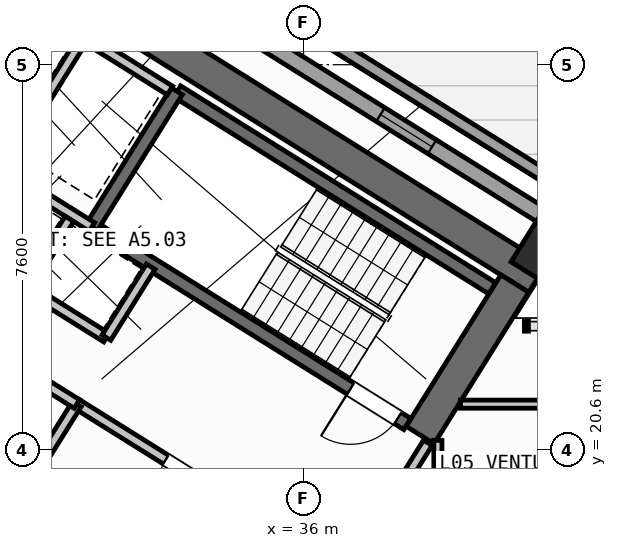
"""IFC4 building model, lengths in metres.
Left out: names, types, materials, properties, quantities, classifications, styles, units other than length and angle.
Written with IfcOpenShell. Run it as: python <this file> out.ifc"""

import sys

from ifc_helpers import new_model, si_unit, direction, frame, frame_2d, origin, origin_2d, place, context, subcontext, project, spatial, rectangle, hollow_rectangle, extrude, source, transform, mapped, element, fill, save


model = new_model("IFC4")
c1 = context("Model", 3, precision=1e-05, world=origin(), true_north=direction((0.0, 1.0)))
c2 = subcontext(c1, "Body", "Model", "MODEL_VIEW")
j1 = project(units=[si_unit("LENGTHUNIT", "METRE"), si_unit("PLANEANGLEUNIT", "RADIAN")], contexts=[c1])
p1 = place(None, origin())
s1 = spatial("IfcSite", under=j1, at=p1, CompositionType="ELEMENT")
p2 = place(p1, origin())
s2 = spatial("IfcBuilding", under=s1, at=p2, CompositionType="ELEMENT")
p3 = place(p2, frame((0.0, 0.0, 24.0)))
s3 = spatial("IfcBuildingStorey", under=s2, at=p3, CompositionType="ELEMENT", Elevation=24.0)
p4 = place(p3, frame((40.615, 23.983, 0.0), z_axis=(0.0, 0.0, 1.0), x_axis=(-0.848045953968, 0.529922692436, 0.0)))
e1 = element("IfcWall", 1, at=p4, inside=s3, PredefinedType="SHEAR", context=c2, shape_type="SweptSolid", body=[
    extrude(rectangle(XDim=13.24, YDim=0.65, at=frame_2d((6.62, 0.0))), origin(), (0.0, 0.0, 1.0), 3.35),
])
p5 = place(p3, frame((40.168, 23.88, 0.0), z_axis=(0.0, 0.0, 1.0), x_axis=(-0.529893103397, -0.8480644427, 0.0)))
e2 = element("IfcWall", 2, at=p5, inside=s3, PredefinedType="SHEAR", context=c2, shape_type="SweptSolid", body=[
    extrude(rectangle(XDim=3.525, YDim=0.65, at=frame_2d((1.763, 0.0))), origin(), (0.0, 0.0, 1.0), 3.35),
])
m1 = source(origin(), c2, "Body", "SweptSolid", [
    extrude(hollow_rectangle(XDim=1.0, YDim=1.0, WallThickness=0.04, at=origin_2d()), origin(), (0.0, 0.0, 1.0), 3.6),
])
p6 = place(p3, frame((40.783, 24.469, 0.0), z_axis=(0.0, 0.0, 1.0), x_axis=(-0.848048096156, 0.529919264233, 0.0)))
e3 = element("IfcColumn", 3, at=p6, inside=s3, PredefinedType="COLUMN", context=c2, shape_type="MappedRepresentation", body=[
    mapped(m1, transform((0.0, 0.0, 0.0), scale=1.0)),
])
p7 = place(p3, frame((40.961, 25.878, 0.0), z_axis=(0.0, 0.0, 1.0), x_axis=(-0.848053997745, 0.5299098196, 0.0)))
e4 = element("IfcWall", 4, at=p7, inside=s3, PredefinedType="PARAPET", context=c2, shape_type="SweptSolid", body=[
    extrude(rectangle(XDim=11.574, YDim=0.24, at=frame_2d((5.787, 0.0))), origin(), (0.0, 0.0, 1.0), 1.15),
])
p8 = place(p3, frame((14.138, 41.825, 0.0), z_axis=(0.0, 0.0, 1.0), x_axis=(0.848046498049, -0.529921821731, 0.0)))
e5 = element("IfcWall", 5, at=p8, inside=s3, PredefinedType="STANDARD", context=c2, shape_type="SweptSolid", body=[
    extrude(rectangle(XDim=31.588, YDim=0.32, at=frame_2d((15.794, 0.0))), origin(), (0.0, 0.0, 1.0), 3.35),
])
p9 = place(p8, frame((3.369, 0.0, 0.0)))
e6 = element("IfcOpeningElement", 6, at=p9, cuts=e5, PredefinedType="OPENING", context=c2, shape_type="SweptSolid", body=[
    extrude(rectangle(XDim=1.05, YDim=2.15, at=frame_2d((0.525, 1.075))), frame((0.0, 0.17, 0.0), z_axis=(0.0, -1.0, 0.0), x_axis=(1.0, 0.0, 0.0)), (0.0, 0.0, 1.0), 0.34),
])
p10 = place(p8, frame((0.946, 0.0, 0.85)))
e7 = element("IfcOpeningElement", 7, at=p10, cuts=e5, PredefinedType="OPENING", context=c2, shape_type="SweptSolid", body=[
    extrude(rectangle(XDim=1.8, YDim=1.5, at=frame_2d((0.9, 0.75))), frame((0.0, 0.17, 0.0), z_axis=(0.0, -1.0, 0.0), x_axis=(1.0, 0.0, 0.0)), (0.0, 0.0, 1.0), 0.34),
])
p11 = place(p8, frame((8.46, 0.0, 0.85)))
e8 = element("IfcOpeningElement", 8, at=p11, cuts=e5, PredefinedType="OPENING", context=c2, shape_type="SweptSolid", body=[
    extrude(rectangle(XDim=1.8, YDim=1.5, at=frame_2d((0.9, 0.75))), frame((0.0, 0.17, 0.0), z_axis=(0.0, -1.0, 0.0), x_axis=(1.0, 0.0, 0.0)), (0.0, 0.0, 1.0), 0.34),
])
p12 = place(p8, frame((13.899, 0.0, 0.85)))
e9 = element("IfcOpeningElement", 9, at=p12, cuts=e5, PredefinedType="OPENING", context=c2, shape_type="SweptSolid", body=[
    extrude(rectangle(XDim=1.5, YDim=1.5, at=frame_2d((0.75, 0.75))), frame((0.0, 0.17, 0.0), z_axis=(0.0, -1.0, 0.0), x_axis=(1.0, 0.0, 0.0)), (0.0, 0.0, 1.0), 0.34),
])
p13 = place(p8, frame((22.019, 0.0, 0.95)))
e10 = element("IfcOpeningElement", 10, at=p13, cuts=e5, PredefinedType="OPENING", context=c2, shape_type="SweptSolid", body=[
    extrude(rectangle(XDim=1.2, YDim=1.4, at=frame_2d((0.6, 0.7))), frame((0.0, 0.17, 0.0), z_axis=(0.0, -1.0, 0.0), x_axis=(1.0, 0.0, 0.0)), (0.0, 0.0, 1.0), 0.34),
])
p14 = place(p8, frame((27.569, 0.0, 0.95)))
e11 = element("IfcOpeningElement", 11, at=p14, cuts=e5, PredefinedType="OPENING", context=c2, shape_type="SweptSolid", body=[
    extrude(rectangle(XDim=1.2, YDim=1.4, at=frame_2d((0.6, 0.7))), frame((0.0, 0.17, 0.0), z_axis=(0.0, -1.0, 0.0), x_axis=(1.0, 0.0, 0.0)), (0.0, 0.0, 1.0), 0.34),
])
p15 = place(p3, frame((31.28, 18.261, 0.0), z_axis=(0.0, 0.0, 1.0), x_axis=(-0.848051618787, 0.529913626805, 0.0)))
e12 = element("IfcWall", 12, at=p15, inside=s3, PredefinedType="SHEAR", context=c2, shape_type="SweptSolid", body=[
    extrude(rectangle(XDim=7.46, YDim=0.26, at=frame_2d((3.73, 0.0))), origin(), (0.0, 0.0, 1.0), 3.35),
])
p16 = place(p15, frame((0.36, 0.0, 0.0)))
e13 = element("IfcOpeningElement", 13, at=p16, cuts=e12, PredefinedType="OPENING", context=c2, shape_type="SweptSolid", body=[
    extrude(rectangle(XDim=0.86, YDim=2.05, at=frame_2d((0.43, 1.025))), frame((0.0, 0.14, 0.0), z_axis=(0.0, -1.0, 0.0), x_axis=(1.0, 0.0, 0.0)), (0.0, 0.0, 1.0), 0.28),
])
p17 = place(p3, frame((39.721, 23.788, 0.0), z_axis=(0.0, 0.0, 1.0), x_axis=(-0.848054434086, 0.529909121291, 0.0)))
e14 = element("IfcWall", 14, at=p17, inside=s3, PredefinedType="SHEAR", context=c2, shape_type="SweptSolid", body=[
    extrude(rectangle(XDim=7.33, YDim=0.26, at=frame_2d((3.665, 0.0))), origin(), (0.0, 0.0, 1.0), 3.35),
])
p18 = place(p3, frame((38.046, 21.108, 0.0), z_axis=(0.0, 0.0, 1.0), x_axis=(-0.848054434086, 0.529909121291, 0.0)))
e15 = element("IfcWall", 15, at=p18, inside=s3, PredefinedType="SHEAR", context=c2, shape_type="SweptSolid", body=[
    extrude(rectangle(XDim=7.33, YDim=0.26, at=frame_2d((3.665, 0.0))), origin(), (0.0, 0.0, 1.0), 3.35),
])
p19 = place(p18, frame((0.22, 0.0, 0.0)))
e16 = element("IfcOpeningElement", 16, at=p19, cuts=e15, PredefinedType="OPENING", context=c2, shape_type="SweptSolid", body=[
    extrude(rectangle(XDim=1.1, YDim=2.1, at=frame_2d((0.55, 1.05))), frame((0.0, 0.14, 0.0), z_axis=(0.0, -1.0, 0.0), x_axis=(1.0, 0.0, 0.0)), (0.0, 0.0, 1.0), 0.28),
])
p20 = place(p3, frame((33.496, 27.677, 0.0), z_axis=(0.0, 0.0, 1.0), x_axis=(-0.529908658664, -0.84805472316, 0.0)))
e17 = element("IfcWall", 17, at=p20, inside=s3, PredefinedType="SHEAR", context=c2, shape_type="SweptSolid", body=[
    extrude(rectangle(XDim=3.16, YDim=0.26, at=frame_2d((1.58, 0.0))), origin(), (0.0, 0.0, 1.0), 3.35),
])
p21 = place(p3, frame((36.374, 18.474, 0.0), z_axis=(0.0, 0.0, 1.0), x_axis=(-0.848051071577, 0.529914502535, 0.0)))
e18 = element("IfcWall", 18, at=p21, inside=s3, PredefinedType="STANDARD", context=c2, shape_type="SweptSolid", body=[
    extrude(rectangle(XDim=5.718, YDim=0.2, at=frame_2d((2.859, 0.0))), origin(), (0.0, 0.0, 1.0), 3.34),
])
p22 = place(p21, frame((2.498, 0.0, 0.0)))
e19 = element("IfcOpeningElement", 19, at=p22, cuts=e18, PredefinedType="OPENING", context=c2, shape_type="SweptSolid", body=[
    extrude(rectangle(XDim=1.15, YDim=2.1, at=frame_2d((0.575, 1.05))), frame((0.0, 0.11, 0.0), z_axis=(0.0, -1.0, 0.0), x_axis=(1.0, 0.0, 0.0)), (0.0, 0.0, 1.0), 0.22),
])
p23 = place(p3, frame((31.822, 24.998, 0.0), z_axis=(0.0, 0.0, 1.0), x_axis=(-0.848058348634, 0.529902856485, 0.0)))
e20 = element("IfcWall", 20, at=p23, inside=s3, PredefinedType="STANDARD", context=c2, shape_type="SweptSolid", body=[
    extrude(rectangle(XDim=4.568, YDim=0.2, at=frame_2d((2.284, 0.0))), origin(), (0.0, 0.0, 1.0), 3.34),
])
p24 = place(p3, frame((32.108, 22.814, 0.0), z_axis=(0.0, 0.0, 1.0), x_axis=(-0.848042229521, 0.529928652696, 0.0)))
e21 = element("IfcWall", 21, at=p24, inside=s3, PredefinedType="STANDARD", context=c2, shape_type="SweptSolid", body=[
    extrude(rectangle(XDim=5.62, YDim=0.2, at=frame_2d((2.81, 0.0))), origin(), (0.0, 0.0, 1.0), 3.34),
])
p25 = place(p3, frame((32.982, 24.213, 0.0), z_axis=(0.0, 0.0, 1.0), x_axis=(-0.529839334948, -0.84809803628, 0.0)))
e22 = element("IfcWall", 22, at=p25, inside=s3, PredefinedType="STANDARD", context=c2, shape_type="SweptSolid", body=[
    extrude(rectangle(XDim=1.65, YDim=0.2, at=frame_2d((0.825, 0.0))), origin(), (0.0, 0.0, 1.0), 3.34),
])
p26 = place(p3, frame((31.645, 28.716, 0.0), z_axis=(0.0, 0.0, 1.0), x_axis=(-0.52986693015, -0.848080795876, 0.0)))
e23 = element("IfcWall", 23, at=p26, inside=s3, PredefinedType="STANDARD", context=c2, shape_type="SweptSolid", body=[
    extrude(rectangle(XDim=2.66, YDim=0.2, at=frame_2d((1.33, 0.0))), origin(), (0.0, 0.0, 1.0), 3.34),
])
p27 = place(p3, frame((33.363, 27.69, 0.0), z_axis=(0.0, 0.0, 1.0), x_axis=(-0.848053806312, 0.529910125964, 0.0)))
e24 = element("IfcWall", 24, at=p27, inside=s3, PredefinedType="STANDARD", context=c2, shape_type="SweptSolid", body=[
    extrude(rectangle(XDim=4.448, YDim=0.2, at=frame_2d((2.224, 0.0))), origin(), (0.0, 0.0, 1.0), 3.34),
])
p28 = place(p3, frame((31.379, 25.156, 0.0), z_axis=(0.0, 0.0, 1.0), x_axis=(-0.529998940003, -0.847998304005, 0.0)))
e25 = element("IfcWall", 25, at=p28, inside=s3, PredefinedType="STANDARD", context=c2, shape_type="SweptSolid", body=[
    extrude(rectangle(XDim=1.58, YDim=0.2, at=frame_2d((0.79, 0.0))), origin(), (0.0, 0.0, 1.0), 3.34),
])
p29 = place(p3, frame((31.525, 21.504, 0.0), z_axis=(0.0, 0.0, 1.0), x_axis=(-0.529907497854, -0.848055448493, 0.0)))
e26 = element("IfcWall", 26, at=p29, inside=s3, PredefinedType="STANDARD", context=c2, shape_type="SweptSolid", body=[
    extrude(rectangle(XDim=2.88, YDim=0.2, at=frame_2d((1.44, 0.0))), origin(), (0.0, 0.0, 1.0), 3.34),
])
p30 = place(p3, frame((31.525, 21.504, 0.0), z_axis=(0.0, 0.0, 1.0), x_axis=(-0.848044998614, 0.529924221305, 0.0)))
e27 = element("IfcWall", 27, at=p30, inside=s3, PredefinedType="STANDARD", context=c2, shape_type="SweptSolid", body=[
    extrude(rectangle(XDim=6.168, YDim=0.2, at=frame_2d((3.084, 0.0))), origin(), (0.0, 0.0, 1.0), 3.34),
])
p31 = place(p30, frame((4.4, 0.0, 0.0)))
e28 = element("IfcOpeningElement", 28, at=p31, cuts=e27, PredefinedType="OPENING", context=c2, shape_type="SweptSolid", body=[
    extrude(rectangle(XDim=0.86, YDim=2.05, at=frame_2d((0.43, 1.025))), frame((0.0, 0.11, 0.0), z_axis=(0.0, -1.0, 0.0), x_axis=(1.0, 0.0, 0.0)), (0.0, 0.0, 1.0), 0.22),
])
p32 = place(p30, frame((1.45, 0.0, 0.0)))
e29 = element("IfcOpeningElement", 29, at=p32, cuts=e27, PredefinedType="OPENING", context=c2, shape_type="SweptSolid", body=[
    extrude(rectangle(XDim=0.86, YDim=2.05, at=frame_2d((0.43, 1.025))), frame((0.0, 0.11, 0.0), z_axis=(0.0, -1.0, 0.0), x_axis=(1.0, 0.0, 0.0)), (0.0, 0.0, 1.0), 0.22),
])
p33 = place(p3, frame((38.451, 20.737, 0.0), z_axis=(0.0, 0.0, 1.0), x_axis=(-0.529924799939, -0.848044637038, 0.0)))
e30 = element("IfcWall", 30, at=p33, inside=s3, PredefinedType="STANDARD", context=c2, shape_type="SweptSolid", body=[
    extrude(rectangle(XDim=2.96, YDim=0.2, at=frame_2d((1.48, 0.0))), origin(), (0.0, 0.0, 1.0), 3.34),
])
p34 = place(p33, frame((1.46, 0.0, 0.0)))
e31 = element("IfcOpeningElement", 31, at=p34, cuts=e30, PredefinedType="OPENING", context=c2, shape_type="SweptSolid", body=[
    extrude(rectangle(XDim=0.86, YDim=2.05, at=frame_2d((0.43, 1.025))), frame((0.0, 0.11, 0.0), z_axis=(0.0, -1.0, 0.0), x_axis=(1.0, 0.0, 0.0)), (0.0, 0.0, 1.0), 0.22),
])
p35 = place(p3, frame((38.65, 17.93, 0.0), z_axis=(0.0, 0.0, 1.0), x_axis=(0.0, 1.0, 0.0)))
e32 = element("IfcWall", 32, at=p35, inside=s3, PredefinedType="PARTITIONING", context=c2, shape_type="SweptSolid", body=[
    extrude(rectangle(XDim=2.857, YDim=0.16, at=frame_2d((1.428, 0.0))), origin(), (0.0, 0.0, 1.0), 3.34),
])
p36 = place(p3, frame((39.095, 21.5, 0.0), z_axis=(0.0, 0.0, 1.0), x_axis=(1.0, 0.0, 0.0)))
e33 = element("IfcWall", 33, at=p36, inside=s3, PredefinedType="PARTITIONING", context=c2, shape_type="SweptSolid", body=[
    extrude(rectangle(XDim=7.094, YDim=0.16, at=frame_2d((3.547, 0.0))), origin(), (0.0, 0.0, 1.0), 3.34),
])
m2 = source(origin(), c2, "Body", "SweptSolid", [
    extrude(rectangle(XDim=1.2, YDim=1.4, at=frame_2d((0.6, 0.7))), frame((0.0, 0.03, 0.0), z_axis=(0.0, -1.0, 0.0), x_axis=(1.0, 0.0, 0.0)), (0.0, 0.0, 1.0), 0.06),
])
p37 = place(p14, origin())
e34 = element("IfcWindow", 34, at=p37, inside=s3, PartitioningType="SINGLE_PANEL", PredefinedType="WINDOW", context=c2, shape_type="MappedRepresentation", body=[
    mapped(m2, transform((0.0, 0.0, 0.0), scale=1.0)),
])
fill(e11, e34)
m3 = source(origin(), c2, "Body", "SweptSolid", [
    extrude(rectangle(XDim=1.1, YDim=2.1, at=frame_2d((0.55, 1.05))), frame((0.0, 0.025, 0.0), z_axis=(0.0, -1.0, 0.0), x_axis=(1.0, 0.0, 0.0)), (0.0, 0.0, 1.0), 0.05),
])
p38 = place(p19, origin())
e35 = element("IfcDoor", 35, at=p38, inside=s3, OperationType="SINGLE_SWING_RIGHT", PredefinedType="DOOR", context=c2, shape_type="MappedRepresentation", body=[
    mapped(m3, transform((0.0, 0.0, 0.0), scale=1.0)),
])
fill(e16, e35)
m4 = source(origin(), c2, "Body", "SweptSolid", [
    extrude(rectangle(XDim=1.15, YDim=2.1, at=frame_2d((0.575, 1.05))), frame((0.0, 0.025, 0.0), z_axis=(0.0, -1.0, 0.0), x_axis=(1.0, 0.0, 0.0)), (0.0, 0.0, 1.0), 0.05),
])
p39 = place(p22, origin())
e36 = element("IfcDoor", 36, at=p39, inside=s3, OperationType="SINGLE_SWING_LEFT", PredefinedType="DOOR", context=c2, shape_type="MappedRepresentation", body=[
    mapped(m4, transform((0.0, 0.0, 0.0), scale=1.0)),
])
fill(e19, e36)
save(model, sys.argv[1])
